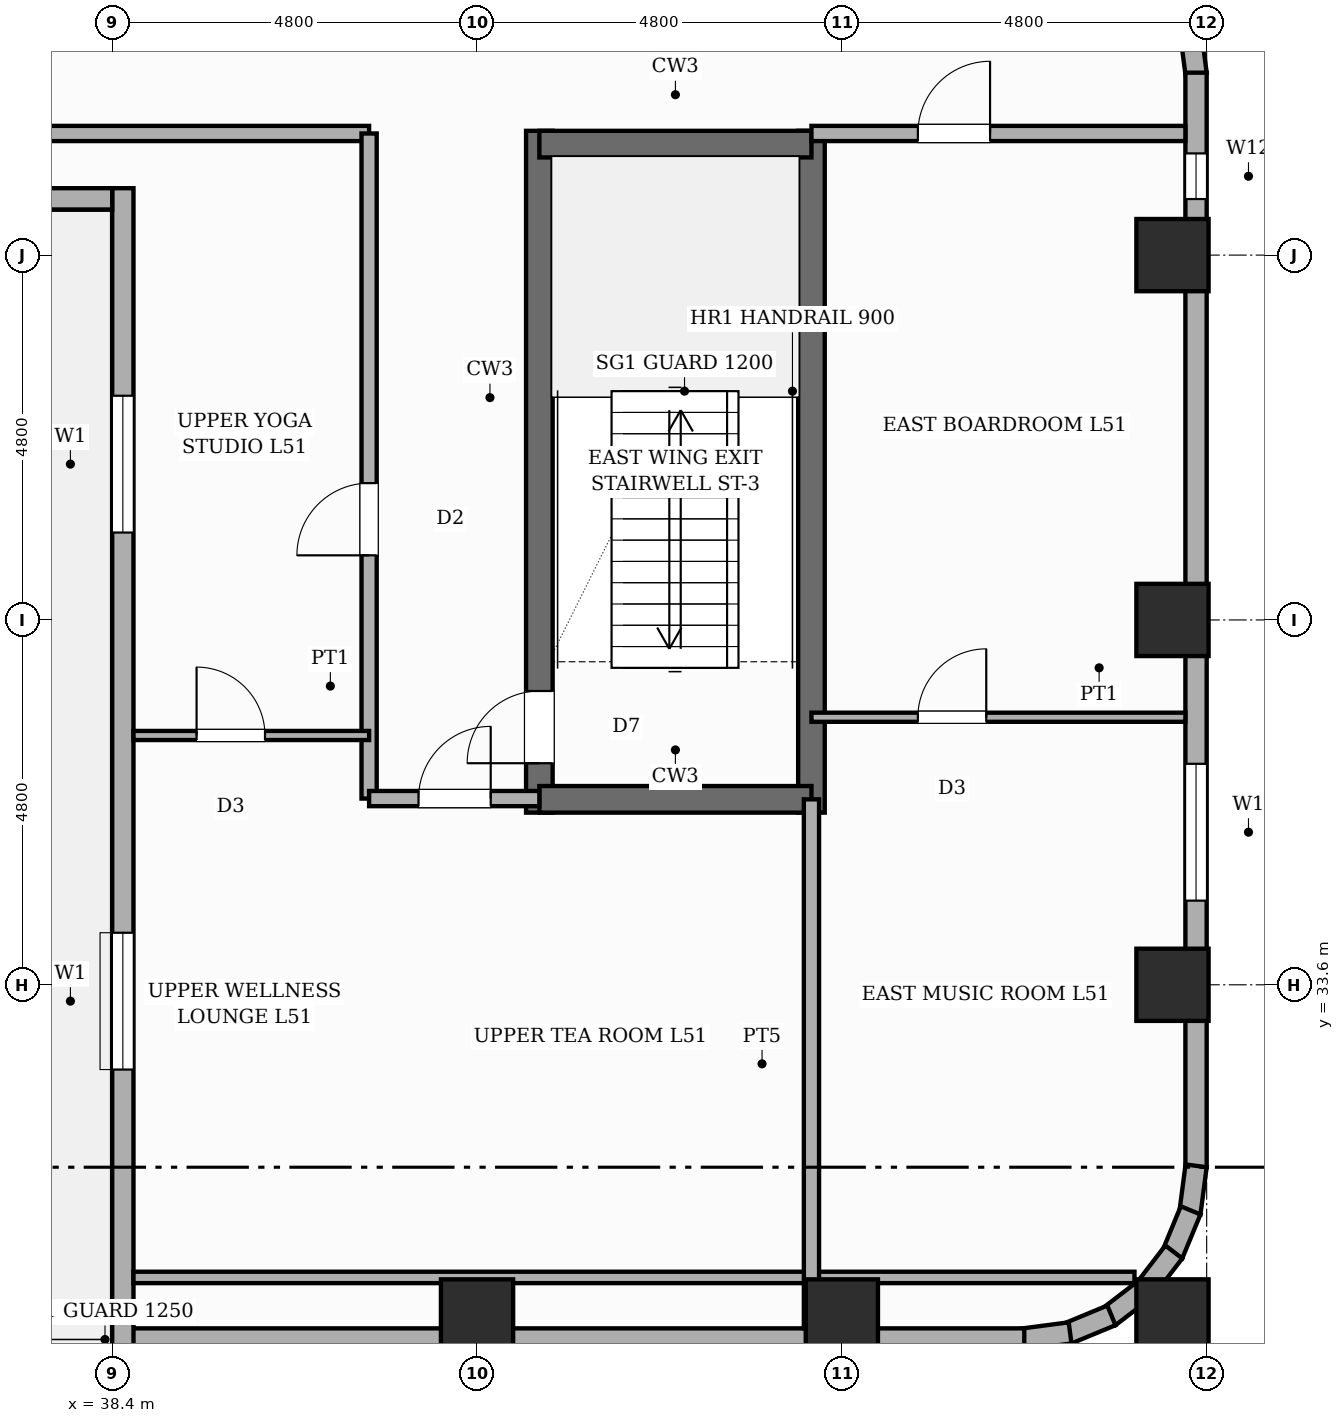
"""IFC4 building model, lengths in metres.
Left out: names, types, materials, properties, quantities, classifications, styles, units other than length and angle.
Written with IfcOpenShell. Run it as: python <this file> out.ifc"""

import sys

from ifc_helpers import new_model, si_unit, direction, frame, frame_2d, origin, origin_2d, place, context, subcontext, project, spatial, rectangle, extrude, element, fill, save


model = new_model("IFC4")
c1 = context("Model", 3, precision=1e-05, world=origin(), true_north=direction((0.0, 1.0)))
c2 = subcontext(c1, "Body", "Model", "MODEL_VIEW")
j1 = project(units=[si_unit("LENGTHUNIT", "METRE"), si_unit("PLANEANGLEUNIT", "RADIAN")], contexts=[c1])
p1 = place(None, origin())
s1 = spatial("IfcSite", under=j1, at=p1, CompositionType="ELEMENT")
p2 = place(p1, origin())
s2 = spatial("IfcBuilding", under=s1, at=p2, CompositionType="ELEMENT")
p3 = place(p2, frame((0.0, 0.0, 193.6)))
s3 = spatial("IfcBuildingStorey", under=s2, at=p3, CompositionType="ELEMENT", Elevation=193.6)
p4 = place(p3, frame((44.02, 35.865, 0.0), z_axis=(0.0, 0.0, 1.0), x_axis=(0.0, 1.0, 0.0)))
e1 = element("IfcWall", 1, at=p4, inside=s3, PredefinedType="SHEAR", context=c2, shape_type="SweptSolid", body=[
    extrude(rectangle(XDim=8.97, YDim=0.35, at=frame_2d((4.485, 0.0))), origin(), (0.0, 0.0, 1.0), 4.8),
])
p5 = place(p4, frame((0.65, 0.0, 0.0)))
e2 = element("IfcOpeningElement", 2, at=p5, cuts=e1, PredefinedType="OPENING", context=c2, shape_type="SweptSolid", body=[
    extrude(rectangle(XDim=0.95, YDim=2.1, at=frame_2d((0.475, 1.05))), frame((0.0, 0.185, 0.0), z_axis=(0.0, -1.0, 0.0), x_axis=(1.0, 0.0, 0.0)), (0.0, 0.0, 1.0), 0.37),
])
p6 = place(p3, frame((47.6, 35.865, 0.0), z_axis=(0.0, 0.0, 1.0), x_axis=(0.0, 1.0, 0.0)))
e3 = element("IfcWall", 3, at=p6, inside=s3, PredefinedType="SHEAR", context=c2, shape_type="SweptSolid", body=[
    extrude(rectangle(XDim=8.97, YDim=0.35, at=frame_2d((4.485, 0.0))), origin(), (0.0, 0.0, 1.0), 4.8),
])
for number, where, z_axis, x_axis in (
    (4, (44.02, 36.04, 0.0), (0.0, 0.0, 1.0), (1.0, 0.0, 0.0)),
    (5, (44.02, 44.66, 0.0), (0.0, 0.0, 1.0), (1.0, 0.0, 0.0)),
):
    element("IfcWall", number, at=place(p3, frame(where, z_axis=z_axis, x_axis=x_axis)), inside=s3, PredefinedType="SHEAR", context=c2, shape_type="SweptSolid", body=[
        extrude(rectangle(XDim=3.58, YDim=0.35, at=frame_2d((1.79, 0.0))), origin(), (0.0, 0.0, 1.0), 4.8),
    ])
for number, where, z_axis, x_axis in (
    (6, (43.2, 29.25, 0.0), (0.0, 0.0, 1.0), (1.0, 0.0, 0.0)),
    (7, (48.0, 29.25, 0.0), (0.0, 0.0, 1.0), (1.0, 0.0, 0.0)),
    (8, (52.35, 29.25, 0.0), (0.0, 0.0, 1.0), (1.0, 0.0, 0.0)),
    (9, (52.35, 33.6, 0.0), (0.0, 0.0, 1.0), (1.0, 0.0, 0.0)),
    (10, (52.35, 38.4, 0.0), (0.0, 0.0, 1.0), (1.0, 0.0, 0.0)),
    (11, (52.35, 43.2, 0.0), (0.0, 0.0, 1.0), (1.0, 0.0, 0.0)),
):
    element("IfcColumn", number, at=place(p3, frame(where, z_axis=z_axis, x_axis=x_axis)), inside=s3, PredefinedType="COLUMN", context=c2, shape_type="SweptSolid", body=[
        extrude(rectangle(XDim=0.95, YDim=0.95, at=origin_2d()), origin(), (0.0, 0.0, 1.0), 4.8),
    ])
p7 = place(p3, frame((52.579, 46.203, 0.0), z_axis=(0.0, 0.0, 1.0), x_axis=(0.130555323746, -0.9914410257, 0.0)))
e12 = element("IfcWall", 12, at=p7, inside=s3, PredefinedType="STANDARD", context=c2, shape_type="SweptSolid", body=[
    extrude(rectangle(XDim=0.626, YDim=0.28, at=frame_2d((0.313, 0.0))), origin(), (0.0, 0.0, 1.0), 3.78),
])
p8 = place(p3, frame((52.66, 45.6, 0.0), z_axis=(0.0, 0.0, 1.0), x_axis=(0.0, -1.0, 0.0)))
e13 = element("IfcWall", 13, at=p8, inside=s3, PredefinedType="STANDARD", context=c2, shape_type="SweptSolid", body=[
    extrude(rectangle(XDim=14.4, YDim=0.28, at=frame_2d((7.2, 0.0))), origin(), (0.0, 0.0, 1.0), 3.78),
])
p9 = place(p8, frame((1.062, 0.0, 0.45)))
e14 = element("IfcOpeningElement", 14, at=p9, cuts=e13, PredefinedType="OPENING", context=c2, shape_type="SweptSolid", body=[
    extrude(rectangle(XDim=0.6, YDim=1.8, at=frame_2d((0.3, 0.9))), frame((0.0, 0.15, 0.0), z_axis=(0.0, -1.0, 0.0), x_axis=(1.0, 0.0, 0.0)), (0.0, 0.0, 1.0), 0.3),
])
p10 = place(p8, frame((9.093, 0.0, 0.8)))
e15 = element("IfcOpeningElement", 15, at=p10, cuts=e13, PredefinedType="OPENING", context=c2, shape_type="SweptSolid", body=[
    extrude(rectangle(XDim=1.8, YDim=2.1, at=frame_2d((0.9, 1.05))), frame((0.0, 0.15, 0.0), z_axis=(0.0, -1.0, 0.0), x_axis=(1.0, 0.0, 0.0)), (0.0, 0.0, 1.0), 0.3),
])
p11 = place(p3, frame((52.661, 31.218, 0.0), z_axis=(0.0, 0.0, 1.0), x_axis=(-0.130555323746, -0.9914410257, 0.0)))
e16 = element("IfcWall", 16, at=p11, inside=s3, PredefinedType="STANDARD", context=c2, shape_type="SweptSolid", body=[
    extrude(rectangle(XDim=0.626, YDim=0.28, at=frame_2d((0.313, 0.0))), origin(), (0.0, 0.0, 1.0), 3.78),
])
p12 = place(p3, frame((52.589, 30.632, 0.0), z_axis=(0.0, 0.0, 1.0), x_axis=(-0.382787856107, -0.923836271867, 0.0)))
e17 = element("IfcWall", 17, at=p12, inside=s3, PredefinedType="STANDARD", context=c2, shape_type="SweptSolid", body=[
    extrude(rectangle(XDim=0.626, YDim=0.28, at=frame_2d((0.313, 0.0))), origin(), (0.0, 0.0, 1.0), 3.78),
])
for number, where, z_axis, x_axis in (
    (18, (52.367, 30.085, 0.0), (0.0, 0.0, 1.0), (-0.609, -0.793, 0.0)),
    (19, (52.012, 29.614, 0.0), (0.0, 0.0, 1.0), (-0.793, -0.609, 0.0)),
    (20, (51.546, 29.251, 0.0), (0.0, 0.0, 1.0), (-0.924, -0.383, 0.0)),
):
    element("IfcWall", number, at=place(p3, frame(where, z_axis=z_axis, x_axis=x_axis)), inside=s3, PredefinedType="STANDARD", context=c2, shape_type="SweptSolid", body=[
        extrude(rectangle(XDim=0.626, YDim=0.28, at=frame_2d((0.313, 0.0))), origin(), (0.0, 0.0, 1.0), 3.78),
    ])
p13 = place(p3, frame((51.003, 29.021, 0.0), z_axis=(0.0, 0.0, 1.0), x_axis=(-0.991447664465, -0.130504898859, 0.0)))
e21 = element("IfcWall", 21, at=p13, inside=s3, PredefinedType="STANDARD", context=c2, shape_type="SweptSolid", body=[
    extrude(rectangle(XDim=0.627, YDim=0.28, at=frame_2d((0.313, 0.0))), origin(), (0.0, 0.0, 1.0), 3.78),
])
p14 = place(p3, frame((50.4, 28.94, 0.0), z_axis=(0.0, 0.0, 1.0), x_axis=(-1.0, 0.0, 0.0)))
e22 = element("IfcWall", 22, at=p14, inside=s3, PredefinedType="STANDARD", context=c2, shape_type="SweptSolid", body=[
    extrude(rectangle(XDim=12.0, YDim=0.28, at=frame_2d((6.0, 0.0))), origin(), (0.0, 0.0, 1.0), 2.98),
])
p15 = place(p3, frame((38.54, 28.8, 0.0), z_axis=(0.0, 0.0, 1.0), x_axis=(0.0, 1.0, 0.0)))
e23 = element("IfcWall", 23, at=p15, inside=s3, PredefinedType="STANDARD", context=c2, shape_type="SweptSolid", body=[
    extrude(rectangle(XDim=15.28, YDim=0.28, at=frame_2d((7.64, 0.0))), origin(), (0.0, 0.0, 1.0), 4.5),
])
p16 = place(p15, frame((3.685, 0.0, 0.8)))
e24 = element("IfcOpeningElement", 24, at=p16, cuts=e23, PredefinedType="OPENING", context=c2, shape_type="SweptSolid", body=[
    extrude(rectangle(XDim=1.8, YDim=2.1, at=frame_2d((0.9, 1.05))), frame((0.0, 0.15, 0.0), z_axis=(0.0, -1.0, 0.0), x_axis=(1.0, 0.0, 0.0)), (0.0, 0.0, 1.0), 0.3),
])
p17 = place(p15, frame((10.75, 0.0, 0.8)))
e25 = element("IfcOpeningElement", 25, at=p17, cuts=e23, PredefinedType="OPENING", context=c2, shape_type="SweptSolid", body=[
    extrude(rectangle(XDim=1.8, YDim=2.1, at=frame_2d((0.9, 1.05))), frame((0.0, 0.15, 0.0), z_axis=(0.0, -1.0, 0.0), x_axis=(1.0, 0.0, 0.0)), (0.0, 0.0, 1.0), 0.3),
])
p18 = place(p3, frame((38.4, 43.94, 0.0), z_axis=(0.0, 0.0, 1.0), x_axis=(-1.0, 0.0, 0.0)))
e26 = element("IfcWall", 26, at=p18, inside=s3, PredefinedType="STANDARD", context=c2, shape_type="SweptSolid", body=[
    extrude(rectangle(XDim=1.24, YDim=0.28, at=frame_2d((0.62, 0.0))), origin(), (0.0, 0.0, 1.0), 4.5),
])
p19 = place(p3, frame((24.75, 44.8, 0.0), z_axis=(0.0, 0.0, 1.0), x_axis=(1.0, 0.0, 0.0)))
e27 = element("IfcWall", 27, at=p19, inside=s3, PredefinedType="PARTITIONING", context=c2, shape_type="SweptSolid", body=[
    extrude(rectangle(XDim=17.03, YDim=0.2, at=frame_2d((8.515, 0.0))), origin(), (0.0, 0.0, 1.0), 4.5),
])
p20 = place(p3, frame((47.6, 44.8, 0.0), z_axis=(0.0, 0.0, 1.0), x_axis=(1.0, 0.0, 0.0)))
e28 = element("IfcWall", 28, at=p20, inside=s3, PredefinedType="PARTITIONING", context=c2, shape_type="SweptSolid", body=[
    extrude(rectangle(XDim=4.92, YDim=0.2, at=frame_2d((2.46, 0.0))), origin(), (0.0, 0.0, 1.0), 4.5),
])
p21 = place(p20, frame((1.4, 0.0, 0.0)))
e29 = element("IfcOpeningElement", 29, at=p21, cuts=e28, PredefinedType="OPENING", context=c2, shape_type="SweptSolid", body=[
    extrude(rectangle(XDim=0.95, YDim=2.15, at=frame_2d((0.475, 1.075))), frame((0.0, 0.11, 0.0), z_axis=(0.0, -1.0, 0.0), x_axis=(1.0, 0.0, 0.0)), (0.0, 0.0, 1.0), 0.22),
])
p22 = place(p3, frame((41.78, 36.05, 0.0), z_axis=(0.0, 0.0, 1.0), x_axis=(0.0, 1.0, 0.0)))
e30 = element("IfcWall", 30, at=p22, inside=s3, PredefinedType="PARTITIONING", context=c2, shape_type="SweptSolid", body=[
    extrude(rectangle(XDim=8.75, YDim=0.2, at=frame_2d((4.375, 0.0))), origin(), (0.0, 0.0, 1.0), 4.5),
])
p23 = place(p22, frame((3.2, 0.0, 0.0)))
e31 = element("IfcOpeningElement", 31, at=p23, cuts=e30, PredefinedType="OPENING", context=c2, shape_type="SweptSolid", body=[
    extrude(rectangle(XDim=0.95, YDim=2.15, at=frame_2d((0.475, 1.075))), frame((0.0, 0.11, 0.0), z_axis=(0.0, -1.0, 0.0), x_axis=(1.0, 0.0, 0.0)), (0.0, 0.0, 1.0), 0.22),
])
p24 = place(p3, frame((41.78, 36.05, 0.0), z_axis=(0.0, 0.0, 1.0), x_axis=(1.0, 0.0, 0.0)))
e32 = element("IfcWall", 32, at=p24, inside=s3, PredefinedType="PARTITIONING", context=c2, shape_type="SweptSolid", body=[
    extrude(rectangle(XDim=2.24, YDim=0.2, at=frame_2d((1.12, 0.0))), origin(), (0.0, 0.0, 1.0), 4.5),
])
p25 = place(p24, frame((0.65, 0.0, 0.0)))
e33 = element("IfcOpeningElement", 33, at=p25, cuts=e32, PredefinedType="OPENING", context=c2, shape_type="SweptSolid", body=[
    extrude(rectangle(XDim=0.95, YDim=2.15, at=frame_2d((0.475, 1.075))), frame((0.0, 0.11, 0.0), z_axis=(0.0, -1.0, 0.0), x_axis=(1.0, 0.0, 0.0)), (0.0, 0.0, 1.0), 0.22),
])
p26 = place(p3, frame((38.68, 29.75, 0.0), z_axis=(0.0, 0.0, 1.0), x_axis=(1.0, 0.0, 0.0)))
e34 = element("IfcWall", 34, at=p26, inside=s3, PredefinedType="PARTITIONING", context=c2, shape_type="SweptSolid", body=[
    extrude(rectangle(XDim=13.17, YDim=0.15, at=frame_2d((6.585, 0.0))), origin(), (0.0, 0.0, 1.0), 2.98),
])
p27 = place(p3, frame((38.68, 36.88, 0.0), z_axis=(0.0, 0.0, 1.0), x_axis=(1.0, 0.0, 0.0)))
e35 = element("IfcWall", 35, at=p27, inside=s3, PredefinedType="PARTITIONING", context=c2, shape_type="SweptSolid", body=[
    extrude(rectangle(XDim=3.1, YDim=0.12, at=frame_2d((1.55, 0.0))), origin(), (0.0, 0.0, 1.0), 4.5),
])
p28 = place(p27, frame((0.83, 0.0, 0.0)))
e36 = element("IfcOpeningElement", 36, at=p28, cuts=e35, PredefinedType="OPENING", context=c2, shape_type="SweptSolid", body=[
    extrude(rectangle(XDim=0.9, YDim=2.15, at=frame_2d((0.45, 1.075))), frame((0.0, 0.07, 0.0), z_axis=(0.0, -1.0, 0.0), x_axis=(1.0, 0.0, 0.0)), (0.0, 0.0, 1.0), 0.14),
])
p29 = place(p3, frame((47.6, 29.08, 0.0), z_axis=(0.0, 0.0, 1.0), x_axis=(0.0, 1.0, 0.0)))
e37 = element("IfcWall", 37, at=p29, inside=s3, PredefinedType="SOLIDWALL", context=c2, shape_type="SweptSolid", body=[
    extrude(rectangle(XDim=6.96, YDim=0.2, at=frame_2d((3.48, 0.0))), origin(), (0.0, 0.0, 1.0), 4.5),
])
p30 = place(p3, frame((47.6, 37.12, 0.0), z_axis=(0.0, 0.0, 1.0), x_axis=(1.0, 0.0, 0.0)))
e38 = element("IfcWall", 38, at=p30, inside=s3, PredefinedType="PARTITIONING", context=c2, shape_type="SweptSolid", body=[
    extrude(rectangle(XDim=4.92, YDim=0.12, at=frame_2d((2.46, 0.0))), origin(), (0.0, 0.0, 1.0), 4.5),
])
p31 = place(p30, frame((1.4, 0.0, 0.0)))
e39 = element("IfcOpeningElement", 39, at=p31, cuts=e38, PredefinedType="OPENING", context=c2, shape_type="SweptSolid", body=[
    extrude(rectangle(XDim=0.9, YDim=2.15, at=frame_2d((0.45, 1.075))), frame((0.0, 0.07, 0.0), z_axis=(0.0, -1.0, 0.0), x_axis=(1.0, 0.0, 0.0)), (0.0, 0.0, 1.0), 0.14),
])
p32 = place(p9, origin())
e40 = element("IfcWindow", 40, at=p32, inside=s3, PartitioningType="SINGLE_PANEL", PredefinedType="WINDOW", context=c2, shape_type="SweptSolid", body=[
    extrude(rectangle(XDim=0.6, YDim=1.8, at=frame_2d((0.3, 0.9))), frame((0.0, 0.03, 0.0), z_axis=(0.0, -1.0, 0.0), x_axis=(1.0, 0.0, 0.0)), (0.0, 0.0, 1.0), 0.06),
])
fill(e14, e40)
p33 = place(p10, origin())
e41 = element("IfcWindow", 41, at=p33, inside=s3, PartitioningType="SINGLE_PANEL", PredefinedType="WINDOW", context=c2, shape_type="SweptSolid", body=[
    extrude(rectangle(XDim=1.8, YDim=2.1, at=frame_2d((0.9, 1.05))), frame((0.0, 0.03, 0.0), z_axis=(0.0, -1.0, 0.0), x_axis=(1.0, 0.0, 0.0)), (0.0, 0.0, 1.0), 0.06),
])
fill(e15, e41)
p34 = place(p16, origin())
e42 = element("IfcWindow", 42, at=p34, inside=s3, PartitioningType="SINGLE_PANEL", PredefinedType="WINDOW", context=c2, shape_type="SweptSolid", body=[
    extrude(rectangle(XDim=1.8, YDim=2.1, at=frame_2d((0.9, 1.05))), frame((0.0, 0.03, 0.0), z_axis=(0.0, -1.0, 0.0), x_axis=(1.0, 0.0, 0.0)), (0.0, 0.0, 1.0), 0.06),
])
fill(e24, e42)
p35 = place(p17, origin())
e43 = element("IfcWindow", 43, at=p35, inside=s3, PartitioningType="SINGLE_PANEL", PredefinedType="WINDOW", context=c2, shape_type="SweptSolid", body=[
    extrude(rectangle(XDim=1.8, YDim=2.1, at=frame_2d((0.9, 1.05))), frame((0.0, 0.03, 0.0), z_axis=(0.0, -1.0, 0.0), x_axis=(1.0, 0.0, 0.0)), (0.0, 0.0, 1.0), 0.06),
])
fill(e25, e43)
p36 = place(p5, origin())
e44 = element("IfcDoor", 44, at=p36, inside=s3, OperationType="SINGLE_SWING_LEFT", PredefinedType="DOOR", context=c2, shape_type="SweptSolid", body=[
    extrude(rectangle(XDim=0.95, YDim=2.1, at=frame_2d((0.475, 1.05))), frame((0.0, 0.025, 0.0), z_axis=(0.0, -1.0, 0.0), x_axis=(1.0, 0.0, 0.0)), (0.0, 0.0, 1.0), 0.05),
])
fill(e2, e44)
p37 = place(p23, origin())
e45 = element("IfcDoor", 45, at=p37, inside=s3, OperationType="SINGLE_SWING_LEFT", PredefinedType="DOOR", context=c2, shape_type="SweptSolid", body=[
    extrude(rectangle(XDim=0.95, YDim=2.15, at=frame_2d((0.475, 1.075))), frame((0.0, 0.025, 0.0), z_axis=(0.0, -1.0, 0.0), x_axis=(1.0, 0.0, 0.0)), (0.0, 0.0, 1.0), 0.05),
])
fill(e31, e45)
p38 = place(p28, origin())
e46 = element("IfcDoor", 46, at=p38, inside=s3, OperationType="SINGLE_SWING_LEFT", PredefinedType="DOOR", context=c2, shape_type="SweptSolid", body=[
    extrude(rectangle(XDim=0.9, YDim=2.15, at=frame_2d((0.45, 1.075))), frame((0.0, 0.025, 0.0), z_axis=(0.0, -1.0, 0.0), x_axis=(1.0, 0.0, 0.0)), (0.0, 0.0, 1.0), 0.05),
])
fill(e36, e46)
p39 = place(p25, origin())
e47 = element("IfcDoor", 47, at=p39, inside=s3, OperationType="SINGLE_SWING_RIGHT", PredefinedType="DOOR", context=c2, shape_type="SweptSolid", body=[
    extrude(rectangle(XDim=0.95, YDim=2.15, at=frame_2d((0.475, 1.075))), frame((0.0, 0.025, 0.0), z_axis=(0.0, -1.0, 0.0), x_axis=(1.0, 0.0, 0.0)), (0.0, 0.0, 1.0), 0.05),
])
fill(e33, e47)
p40 = place(p21, origin())
e48 = element("IfcDoor", 48, at=p40, inside=s3, OperationType="SINGLE_SWING_RIGHT", PredefinedType="DOOR", context=c2, shape_type="SweptSolid", body=[
    extrude(rectangle(XDim=0.95, YDim=2.15, at=frame_2d((0.475, 1.075))), frame((0.0, 0.025, 0.0), z_axis=(0.0, -1.0, 0.0), x_axis=(1.0, 0.0, 0.0)), (0.0, 0.0, 1.0), 0.05),
])
fill(e29, e48)
p41 = place(p31, origin())
e49 = element("IfcDoor", 49, at=p41, inside=s3, OperationType="SINGLE_SWING_RIGHT", PredefinedType="DOOR", context=c2, shape_type="SweptSolid", body=[
    extrude(rectangle(XDim=0.9, YDim=2.15, at=frame_2d((0.45, 1.075))), frame((0.0, 0.025, 0.0), z_axis=(0.0, -1.0, 0.0), x_axis=(1.0, 0.0, 0.0)), (0.0, 0.0, 1.0), 0.05),
])
fill(e39, e49)
save(model, sys.argv[1])
